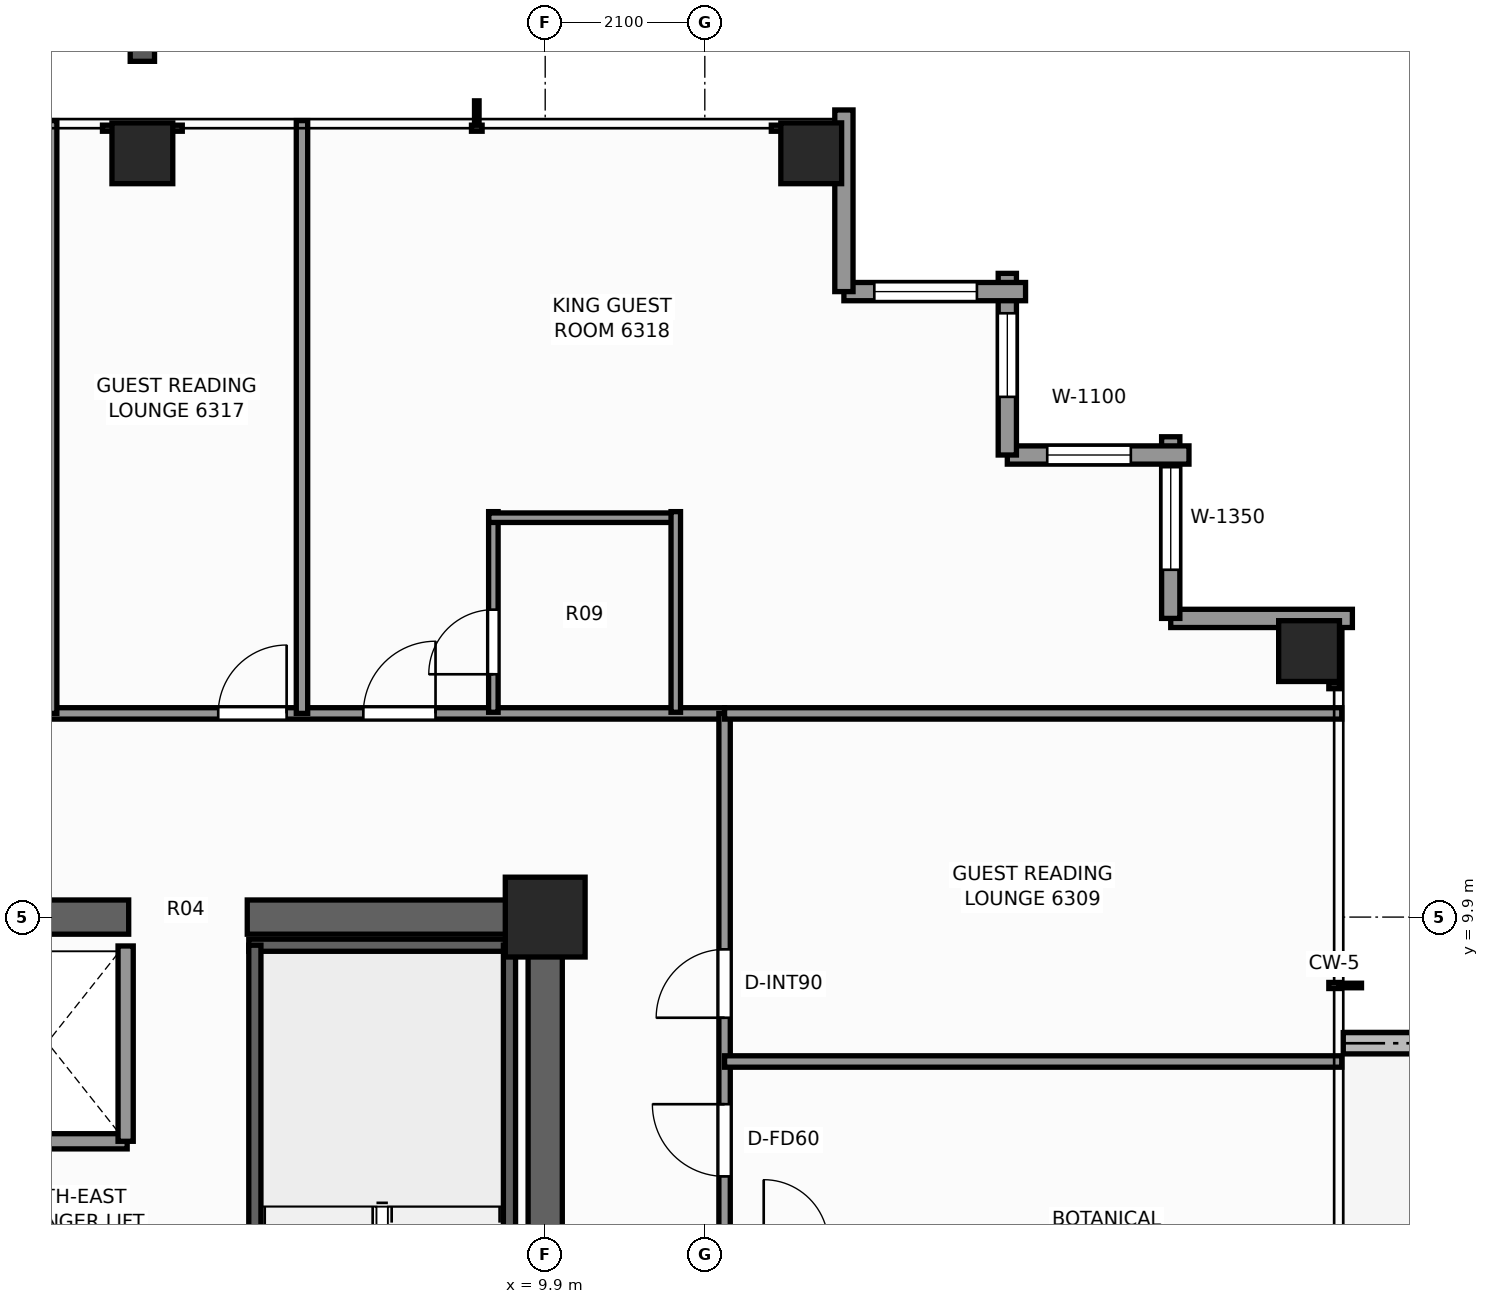
"""IFC4 building model, lengths in metres.
Left out: names, types, materials, properties, quantities, classifications, styles, units other than length and angle.
Written with IfcOpenShell. Run it as: python <this file> out.ifc"""

import sys

from ifc_helpers import new_model, si_unit, direction, frame, frame_2d, origin, origin_2d, place, context, subcontext, project, spatial, rectangle, extrude, element, fill, save


model = new_model("IFC4")
c1 = context("Model", 3, precision=1e-05, world=origin(), true_north=direction((0.0, 1.0)))
c2 = subcontext(c1, "Body", "Model", "MODEL_VIEW")
j1 = project(units=[si_unit("LENGTHUNIT", "METRE"), si_unit("PLANEANGLEUNIT", "RADIAN")], contexts=[c1])
p1 = place(None, origin())
s1 = spatial("IfcSite", under=j1, at=p1, CompositionType="ELEMENT")
p2 = place(p1, origin())
s2 = spatial("IfcBuilding", under=s1, at=p2, CompositionType="ELEMENT")
p3 = place(p2, frame((0.0, 0.0, 216.3)))
s3 = spatial("IfcBuildingStorey", under=s2, at=p3, CompositionType="ELEMENT", Elevation=216.3)
p4 = place(p3, frame((-10.125, 9.9, 0.0), z_axis=(0.0, 0.0, 1.0), x_axis=(1.0, 0.0, 0.0)))
e1 = element("IfcWall", 1, at=p4, inside=s3, PredefinedType="SHEAR", context=c2, shape_type="SweptSolid", body=[
    extrude(rectangle(XDim=14.545, YDim=0.45, at=frame_2d((7.272, 0.0))), origin(), (0.0, 0.0, 1.0), 3.3),
])
p5 = place(p3, frame((5.98, 9.9, 0.0), z_axis=(0.0, 0.0, 1.0), x_axis=(1.0, 0.0, 0.0)))
e2 = element("IfcWall", 2, at=p5, inside=s3, PredefinedType="SHEAR", context=c2, shape_type="SweptSolid", body=[
    extrude(rectangle(XDim=4.145, YDim=0.45, at=frame_2d((2.073, 0.0))), origin(), (0.0, 0.0, 1.0), 3.3),
])
p6 = place(p3, frame((9.9, -3.7, 0.0), z_axis=(0.0, 0.0, 1.0), x_axis=(0.0, 1.0, 0.0)))
e3 = element("IfcWall", 3, at=p6, inside=s3, PredefinedType="SHEAR", context=c2, shape_type="SweptSolid", body=[
    extrude(rectangle(XDim=13.375, YDim=0.45, at=frame_2d((6.688, 0.0))), origin(), (0.0, 0.0, 1.0), 3.3),
])
p7 = place(p6, frame((0.35, 0.0, 0.0)))
e4 = element("IfcOpeningElement", 4, at=p7, cuts=e3, PredefinedType="OPENING", context=c2, shape_type="SweptSolid", body=[
    extrude(rectangle(XDim=1.1, YDim=2.2, at=frame_2d((0.55, 1.1))), frame((0.0, 0.235, 0.0), z_axis=(0.0, -1.0, 0.0), x_axis=(1.0, 0.0, 0.0)), (0.0, 0.0, 1.0), 0.47),
])
p8 = place(p3, frame((9.9, 9.9, 0.0), z_axis=(0.0, 0.0, 1.0), x_axis=(1.0, 0.0, 0.0)))
e5 = element("IfcColumn", 5, at=p8, inside=s3, PredefinedType="COLUMN", context=c2, shape_type="SweptSolid", body=[
    extrude(rectangle(XDim=1.05, YDim=1.05, at=origin_2d()), origin(), (0.0, 0.0, 1.0), 3.3),
])
for number, where, z_axis, x_axis in (
    (6, (4.6, 19.95, 0.0), (0.0, 0.0, 1.0), (1.0, 0.0, 0.0)),
    (7, (13.4, 19.95, 0.0), (0.0, 0.0, 1.0), (1.0, 0.0, 0.0)),
    (8, (19.95, 13.4, 0.0), (0.0, 0.0, 1.0), (1.0, 0.0, 0.0)),
):
    element("IfcColumn", number, at=place(p3, frame(where, z_axis=z_axis, x_axis=x_axis)), inside=s3, PredefinedType="COLUMN", context=c2, shape_type="SweptSolid", body=[
        extrude(rectangle(XDim=0.8, YDim=0.8, at=origin_2d()), origin(), (0.0, 0.0, 1.0), 3.3),
    ])
p9 = place(p3, frame((22.105, 8.24, -0.04), z_axis=(0.0, 0.0, 1.0), x_axis=(-1.0, 0.0, 0.0)))
e9 = element("IfcWall", 9, at=p9, inside=s3, PredefinedType="PARAPET", context=c2, shape_type="SweptSolid", body=[
    extrude(rectangle(XDim=1.705, YDim=0.28, at=frame_2d((0.853, 0.0))), origin(), (0.0, 0.0, 1.0), 0.42),
])
p10 = place(p3, frame((18.13, 13.83, 0.0), z_axis=(0.0, 0.0, 1.0), x_axis=(1.0, 0.0, 0.0)))
e10 = element("IfcWall", 10, at=p10, inside=s3, PredefinedType="STANDARD", context=c2, shape_type="SweptSolid", body=[
    extrude(rectangle(XDim=2.39, YDim=0.24, at=frame_2d((1.195, 0.0))), origin(), (0.0, 0.0, 1.0), 2.463),
])
p11 = place(p3, frame((18.13, 16.22, 0.0), z_axis=(0.0, 0.0, 1.0), x_axis=(0.0, -1.0, 0.0)))
e11 = element("IfcWall", 11, at=p11, inside=s3, PredefinedType="STANDARD", context=c2, shape_type="SweptSolid", body=[
    extrude(rectangle(XDim=2.39, YDim=0.24, at=frame_2d((1.195, 0.0))), origin(), (0.0, 0.0, 1.0), 2.463),
])
p12 = place(p11, frame((0.4, 0.0, 0.65)))
e12 = element("IfcOpeningElement", 12, at=p12, cuts=e11, PredefinedType="OPENING", context=c2, shape_type="SweptSolid", body=[
    extrude(rectangle(XDim=1.35, YDim=1.55, at=frame_2d((0.675, 0.775))), frame((0.0, 0.13, 0.0), z_axis=(0.0, -1.0, 0.0), x_axis=(1.0, 0.0, 0.0)), (0.0, 0.0, 1.0), 0.26),
])
p13 = place(p3, frame((15.98, 15.98, 0.0), z_axis=(0.0, 0.0, 1.0), x_axis=(1.0, 0.0, 0.0)))
e13 = element("IfcWall", 13, at=p13, inside=s3, PredefinedType="STANDARD", context=c2, shape_type="SweptSolid", body=[
    extrude(rectangle(XDim=2.39, YDim=0.24, at=frame_2d((1.195, 0.0))), origin(), (0.0, 0.0, 1.0), 2.463),
])
p14 = place(p13, frame((0.525, 0.0, 0.65)))
e14 = element("IfcOpeningElement", 14, at=p14, cuts=e13, PredefinedType="OPENING", context=c2, shape_type="SweptSolid", body=[
    extrude(rectangle(XDim=1.1, YDim=1.45, at=frame_2d((0.55, 0.725))), frame((0.0, 0.13, 0.0), z_axis=(0.0, -1.0, 0.0), x_axis=(1.0, 0.0, 0.0)), (0.0, 0.0, 1.0), 0.26),
])
p15 = place(p3, frame((15.98, 18.37, 0.0), z_axis=(0.0, 0.0, 1.0), x_axis=(0.0, -1.0, 0.0)))
e15 = element("IfcWall", 15, at=p15, inside=s3, PredefinedType="STANDARD", context=c2, shape_type="SweptSolid", body=[
    extrude(rectangle(XDim=2.39, YDim=0.24, at=frame_2d((1.195, 0.0))), origin(), (0.0, 0.0, 1.0), 2.463),
])
p16 = place(p15, frame((0.525, 0.0, 0.65)))
e16 = element("IfcOpeningElement", 16, at=p16, cuts=e15, PredefinedType="OPENING", context=c2, shape_type="SweptSolid", body=[
    extrude(rectangle(XDim=1.1, YDim=1.45, at=frame_2d((0.55, 0.725))), frame((0.0, 0.13, 0.0), z_axis=(0.0, -1.0, 0.0), x_axis=(1.0, 0.0, 0.0)), (0.0, 0.0, 1.0), 0.26),
])
p17 = place(p3, frame((13.83, 18.13, 0.0), z_axis=(0.0, 0.0, 1.0), x_axis=(1.0, 0.0, 0.0)))
e17 = element("IfcWall", 17, at=p17, inside=s3, PredefinedType="STANDARD", context=c2, shape_type="SweptSolid", body=[
    extrude(rectangle(XDim=2.39, YDim=0.24, at=frame_2d((1.195, 0.0))), origin(), (0.0, 0.0, 1.0), 2.463),
])
p18 = place(p17, frame((0.4, 0.0, 0.65)))
e18 = element("IfcOpeningElement", 18, at=p18, cuts=e17, PredefinedType="OPENING", context=c2, shape_type="SweptSolid", body=[
    extrude(rectangle(XDim=1.35, YDim=1.55, at=frame_2d((0.675, 0.775))), frame((0.0, 0.13, 0.0), z_axis=(0.0, -1.0, 0.0), x_axis=(1.0, 0.0, 0.0)), (0.0, 0.0, 1.0), 0.26),
])
p19 = place(p3, frame((13.83, 20.52, 0.0), z_axis=(0.0, 0.0, 1.0), x_axis=(0.0, -1.0, 0.0)))
e19 = element("IfcWall", 19, at=p19, inside=s3, PredefinedType="STANDARD", context=c2, shape_type="SweptSolid", body=[
    extrude(rectangle(XDim=2.39, YDim=0.24, at=frame_2d((1.195, 0.0))), origin(), (0.0, 0.0, 1.0), 2.463),
])
p20 = place(p3, frame((6.0, 9.53, 0.0), z_axis=(0.0, 0.0, 1.0), x_axis=(1.0, 0.0, 0.0)))
e20 = element("IfcWall", 20, at=p20, inside=s3, PredefinedType="SHEAR", context=c2, shape_type="SweptSolid", body=[
    extrude(rectangle(XDim=3.52, YDim=0.16, at=frame_2d((1.76, 0.0))), origin(), (0.0, 0.0, 1.0), 3.3),
])
for number, where, z_axis, x_axis in (
    (21, (6.08, 1.97, 0.0), (0.0, 0.0, 1.0), (0.0, 1.0, 0.0)),
    (22, (9.43, 1.97, 0.0), (0.0, 0.0, 1.0), (0.0, 1.0, 0.0)),
):
    element("IfcWall", number, at=place(p3, frame(where, z_axis=z_axis, x_axis=x_axis)), inside=s3, PredefinedType="SHEAR", context=c2, shape_type="SweptSolid", body=[
        extrude(rectangle(XDim=7.56, YDim=0.16, at=frame_2d((3.78, 0.0))), origin(), (0.0, 0.0, 1.0), 3.3),
    ])
p21 = place(p3, frame((0.22, 6.95, 0.0), z_axis=(0.0, 0.0, 1.0), x_axis=(1.0, 0.0, 0.0)))
e23 = element("IfcWall", 23, at=p21, inside=s3, PredefinedType="SOLIDWALL", context=c2, shape_type="SweptSolid", body=[
    extrude(rectangle(XDim=4.18, YDim=0.2, at=frame_2d((2.09, 0.0))), origin(), (0.0, 0.0, 1.0), 3.08),
])
p22 = place(p3, frame((4.38, 6.95, 0.0), z_axis=(0.0, 0.0, 1.0), x_axis=(0.0, 1.0, 0.0)))
e24 = element("IfcWall", 24, at=p22, inside=s3, PredefinedType="SOLIDWALL", context=c2, shape_type="SweptSolid", body=[
    extrude(rectangle(XDim=2.57, YDim=0.2, at=frame_2d((1.285, 0.0))), origin(), (0.0, 0.0, 1.0), 3.08),
])
p23 = place(p3, frame((-12.26, 12.58, 0.0), z_axis=(0.0, 0.0, 1.0), x_axis=(1.0, 0.0, 0.0)))
e25 = element("IfcWall", 25, at=p23, inside=s3, PredefinedType="PARTITIONING", context=c2, shape_type="SweptSolid", body=[
    extrude(rectangle(XDim=24.52, YDim=0.15, at=frame_2d((12.26, 0.0))), origin(), (0.0, 0.0, 1.0), 2.369),
])
p24 = place(p23, frame((3.803, 0.0, 0.0)))
e26 = element("IfcOpeningElement", 26, at=p24, cuts=e25, PredefinedType="OPENING", context=c2, shape_type="SweptSolid", body=[
    extrude(rectangle(XDim=0.95, YDim=2.06, at=frame_2d((0.475, 1.03))), frame((0.0, 0.085, 0.0), z_axis=(0.0, -1.0, 0.0), x_axis=(1.0, 0.0, 0.0)), (0.0, 0.0, 1.0), 0.17),
])
p25 = place(p23, frame((5.762, 0.0, 0.0)))
e27 = element("IfcOpeningElement", 27, at=p25, cuts=e25, PredefinedType="OPENING", context=c2, shape_type="SweptSolid", body=[
    extrude(rectangle(XDim=0.9, YDim=2.06, at=frame_2d((0.45, 1.03))), frame((0.0, 0.085, 0.0), z_axis=(0.0, -1.0, 0.0), x_axis=(1.0, 0.0, 0.0)), (0.0, 0.0, 1.0), 0.17),
])
p26 = place(p23, frame((13.518, 0.0, 0.0)))
e28 = element("IfcOpeningElement", 28, at=p26, cuts=e25, PredefinedType="OPENING", context=c2, shape_type="SweptSolid", body=[
    extrude(rectangle(XDim=0.95, YDim=2.06, at=frame_2d((0.475, 1.03))), frame((0.0, 0.085, 0.0), z_axis=(0.0, -1.0, 0.0), x_axis=(1.0, 0.0, 0.0)), (0.0, 0.0, 1.0), 0.17),
])
p27 = place(p23, frame((17.858, 0.0, 0.0)))
e29 = element("IfcOpeningElement", 29, at=p27, cuts=e25, PredefinedType="OPENING", context=c2, shape_type="SweptSolid", body=[
    extrude(rectangle(XDim=0.9, YDim=2.06, at=frame_2d((0.45, 1.03))), frame((0.0, 0.085, 0.0), z_axis=(0.0, -1.0, 0.0), x_axis=(1.0, 0.0, 0.0)), (0.0, 0.0, 1.0), 0.17),
])
p28 = place(p23, frame((19.767, 0.0, 0.0)))
e30 = element("IfcOpeningElement", 30, at=p28, cuts=e25, PredefinedType="OPENING", context=c2, shape_type="SweptSolid", body=[
    extrude(rectangle(XDim=0.95, YDim=2.06, at=frame_2d((0.475, 1.03))), frame((0.0, 0.085, 0.0), z_axis=(0.0, -1.0, 0.0), x_axis=(1.0, 0.0, 0.0)), (0.0, 0.0, 1.0), 0.17),
])
p29 = place(p3, frame((12.26, -12.26, 0.0), z_axis=(0.0, 0.0, 1.0), x_axis=(0.0, 1.0, 0.0)))
e31 = element("IfcWall", 31, at=p29, inside=s3, PredefinedType="PARTITIONING", context=c2, shape_type="SweptSolid", body=[
    extrude(rectangle(XDim=24.84, YDim=0.15, at=frame_2d((12.42, 0.0))), origin(), (0.0, 0.0, 1.0), 2.369),
])
p30 = place(p29, frame((2.686, 0.0, 0.0)))
e32 = element("IfcOpeningElement", 32, at=p30, cuts=e31, PredefinedType="OPENING", context=c2, shape_type="SweptSolid", body=[
    extrude(rectangle(XDim=0.9, YDim=2.06, at=frame_2d((0.45, 1.03))), frame((0.0, 0.085, 0.0), z_axis=(0.0, -1.0, 0.0), x_axis=(1.0, 0.0, 0.0)), (0.0, 0.0, 1.0), 0.17),
])
p31 = place(p29, frame((4.449, 0.0, 0.0)))
e33 = element("IfcOpeningElement", 33, at=p31, cuts=e31, PredefinedType="OPENING", context=c2, shape_type="SweptSolid", body=[
    extrude(rectangle(XDim=0.95, YDim=2.06, at=frame_2d((0.475, 1.03))), frame((0.0, 0.085, 0.0), z_axis=(0.0, -1.0, 0.0), x_axis=(1.0, 0.0, 0.0)), (0.0, 0.0, 1.0), 0.17),
])
p32 = place(p29, frame((13.361, 0.0, 0.0)))
e34 = element("IfcOpeningElement", 34, at=p32, cuts=e31, PredefinedType="OPENING", context=c2, shape_type="SweptSolid", body=[
    extrude(rectangle(XDim=0.95, YDim=2.06, at=frame_2d((0.475, 1.03))), frame((0.0, 0.085, 0.0), z_axis=(0.0, -1.0, 0.0), x_axis=(1.0, 0.0, 0.0)), (0.0, 0.0, 1.0), 0.17),
])
p33 = place(p29, frame((18.748, 0.0, 0.0)))
e35 = element("IfcOpeningElement", 35, at=p33, cuts=e31, PredefinedType="OPENING", context=c2, shape_type="SweptSolid", body=[
    extrude(rectangle(XDim=0.95, YDim=2.06, at=frame_2d((0.475, 1.03))), frame((0.0, 0.085, 0.0), z_axis=(0.0, -1.0, 0.0), x_axis=(1.0, 0.0, 0.0)), (0.0, 0.0, 1.0), 0.17),
])
p34 = place(p29, frame((20.836, 0.0, 0.0)))
e36 = element("IfcOpeningElement", 36, at=p34, cuts=e31, PredefinedType="OPENING", context=c2, shape_type="SweptSolid", body=[
    extrude(rectangle(XDim=0.9, YDim=2.06, at=frame_2d((0.45, 1.03))), frame((0.0, 0.085, 0.0), z_axis=(0.0, -1.0, 0.0), x_axis=(1.0, 0.0, 0.0)), (0.0, 0.0, 1.0), 0.17),
])
p35 = place(p3, frame((12.26, 12.58, 0.0), z_axis=(0.0, 0.0, 1.0), x_axis=(1.0, 0.0, 0.0)))
e37 = element("IfcWall", 37, at=p35, inside=s3, PredefinedType="PARTITIONING", context=c2, shape_type="SweptSolid", body=[
    extrude(rectangle(XDim=8.12, YDim=0.15, at=frame_2d((4.06, 0.0))), origin(), (0.0, 0.0, 1.0), 2.369),
])
p36 = place(p3, frame((12.26, 8.0, 0.0), z_axis=(0.0, 0.0, 1.0), x_axis=(1.0, 0.0, 0.0)))
e38 = element("IfcWall", 38, at=p36, inside=s3, PredefinedType="PARTITIONING", context=c2, shape_type="SweptSolid", body=[
    extrude(rectangle(XDim=8.12, YDim=0.15, at=frame_2d((4.06, 0.0))), origin(), (0.0, 0.0, 1.0), 2.453),
])
for number, where, z_axis, x_axis in (
    (39, (3.4, 12.58, 0.0), (0.0, 0.0, 1.0), (0.0, 1.0, 0.0)),
    (40, (6.7, 12.58, 0.0), (0.0, 0.0, 1.0), (0.0, 1.0, 0.0)),
):
    element("IfcWall", number, at=place(p3, frame(where, z_axis=z_axis, x_axis=x_axis)), inside=s3, PredefinedType="PARTITIONING", context=c2, shape_type="SweptSolid", body=[
        extrude(rectangle(XDim=7.8, YDim=0.15, at=frame_2d((3.9, 0.0))), origin(), (0.0, 0.0, 1.0), 2.453),
    ])
p37 = place(p3, frame((9.218, 12.595, 0.0), z_axis=(0.0, 0.0, 1.0), x_axis=(0.0, 1.0, 0.0)))
e41 = element("IfcWall", 41, at=p37, inside=s3, PredefinedType="PARTITIONING", context=c2, shape_type="SweptSolid", body=[
    extrude(rectangle(XDim=2.64, YDim=0.125, at=frame_2d((1.32, 0.0))), origin(), (0.0, 0.0, 1.0), 3.08),
])
p38 = place(p37, frame((0.5, 0.0, 0.0)))
e42 = element("IfcOpeningElement", 42, at=p38, cuts=e41, PredefinedType="OPENING", context=c2, shape_type="SweptSolid", body=[
    extrude(rectangle(XDim=0.85, YDim=2.03, at=frame_2d((0.425, 1.015))), frame((0.0, 0.073, 0.0), z_axis=(0.0, -1.0, 0.0), x_axis=(1.0, 0.0, 0.0)), (0.0, 0.0, 1.0), 0.145),
])
p39 = place(p3, frame((9.158, 15.155, 0.0), z_axis=(0.0, 0.0, 1.0), x_axis=(1.0, 0.0, 0.0)))
e43 = element("IfcWall", 43, at=p39, inside=s3, PredefinedType="PARTITIONING", context=c2, shape_type="SweptSolid", body=[
    extrude(rectangle(XDim=2.52, YDim=0.125, at=frame_2d((1.26, 0.0))), origin(), (0.0, 0.0, 1.0), 2.369),
])
p40 = place(p3, frame((11.618, 12.595, 0.0), z_axis=(0.0, 0.0, 1.0), x_axis=(0.0, 1.0, 0.0)))
e44 = element("IfcWall", 44, at=p40, inside=s3, PredefinedType="PARTITIONING", context=c2, shape_type="SweptSolid", body=[
    extrude(rectangle(XDim=2.64, YDim=0.125, at=frame_2d((1.32, 0.0))), origin(), (0.0, 0.0, 1.0), 2.369),
])
p41 = place(p12, origin())
e45 = element("IfcWindow", 45, at=p41, inside=s3, PartitioningType="SINGLE_PANEL", PredefinedType="WINDOW", context=c2, shape_type="SweptSolid", body=[
    extrude(rectangle(XDim=1.35, YDim=1.55, at=frame_2d((0.675, 0.775))), frame((0.0, 0.03, 0.0), z_axis=(0.0, -1.0, 0.0), x_axis=(1.0, 0.0, 0.0)), (0.0, 0.0, 1.0), 0.06),
])
fill(e12, e45)
p42 = place(p14, origin())
e46 = element("IfcWindow", 46, at=p42, inside=s3, PartitioningType="SINGLE_PANEL", PredefinedType="WINDOW", context=c2, shape_type="SweptSolid", body=[
    extrude(rectangle(XDim=1.1, YDim=1.45, at=frame_2d((0.55, 0.725))), frame((0.0, 0.03, 0.0), z_axis=(0.0, -1.0, 0.0), x_axis=(1.0, 0.0, 0.0)), (0.0, 0.0, 1.0), 0.06),
])
fill(e14, e46)
p43 = place(p16, origin())
e47 = element("IfcWindow", 47, at=p43, inside=s3, PartitioningType="SINGLE_PANEL", PredefinedType="WINDOW", context=c2, shape_type="SweptSolid", body=[
    extrude(rectangle(XDim=1.1, YDim=1.45, at=frame_2d((0.55, 0.725))), frame((0.0, 0.03, 0.0), z_axis=(0.0, -1.0, 0.0), x_axis=(1.0, 0.0, 0.0)), (0.0, 0.0, 1.0), 0.06),
])
fill(e16, e47)
p44 = place(p18, origin())
e48 = element("IfcWindow", 48, at=p44, inside=s3, PartitioningType="SINGLE_PANEL", PredefinedType="WINDOW", context=c2, shape_type="SweptSolid", body=[
    extrude(rectangle(XDim=1.35, YDim=1.55, at=frame_2d((0.675, 0.775))), frame((0.0, 0.03, 0.0), z_axis=(0.0, -1.0, 0.0), x_axis=(1.0, 0.0, 0.0)), (0.0, 0.0, 1.0), 0.06),
])
fill(e18, e48)
p45 = place(p33, origin())
e49 = element("IfcDoor", 49, at=p45, inside=s3, OperationType="SINGLE_SWING_RIGHT", PredefinedType="DOOR", context=c2, shape_type="SweptSolid", body=[
    extrude(rectangle(XDim=0.95, YDim=2.06, at=frame_2d((0.475, 1.03))), frame((0.0, 0.025, 0.0), z_axis=(0.0, -1.0, 0.0), x_axis=(1.0, 0.0, 0.0)), (0.0, 0.0, 1.0), 0.05),
])
fill(e35, e49)
p46 = place(p34, origin())
e50 = element("IfcDoor", 50, at=p46, inside=s3, OperationType="SINGLE_SWING_LEFT", PredefinedType="DOOR", context=c2, shape_type="SweptSolid", body=[
    extrude(rectangle(XDim=0.9, YDim=2.06, at=frame_2d((0.45, 1.03))), frame((0.0, 0.025, 0.0), z_axis=(0.0, -1.0, 0.0), x_axis=(1.0, 0.0, 0.0)), (0.0, 0.0, 1.0), 0.05),
])
fill(e36, e50)
p47 = place(p27, origin())
e51 = element("IfcDoor", 51, at=p47, inside=s3, OperationType="SINGLE_SWING_RIGHT", PredefinedType="DOOR", context=c2, shape_type="SweptSolid", body=[
    extrude(rectangle(XDim=0.9, YDim=2.06, at=frame_2d((0.45, 1.03))), frame((0.0, 0.025, 0.0), z_axis=(0.0, -1.0, 0.0), x_axis=(1.0, 0.0, 0.0)), (0.0, 0.0, 1.0), 0.05),
])
fill(e29, e51)
p48 = place(p38, origin())
e52 = element("IfcDoor", 52, at=p48, inside=s3, OperationType="SINGLE_SWING_LEFT", PredefinedType="DOOR", context=c2, shape_type="SweptSolid", body=[
    extrude(rectangle(XDim=0.85, YDim=2.03, at=frame_2d((0.425, 1.015))), frame((0.0, 0.025, 0.0), z_axis=(0.0, -1.0, 0.0), x_axis=(1.0, 0.0, 0.0)), (0.0, 0.0, 1.0), 0.05),
])
fill(e42, e52)
p49 = place(p28, origin())
e53 = element("IfcDoor", 53, at=p49, inside=s3, OperationType="SINGLE_SWING_RIGHT", PredefinedType="DOOR", context=c2, shape_type="SweptSolid", body=[
    extrude(rectangle(XDim=0.95, YDim=2.06, at=frame_2d((0.475, 1.03))), frame((0.0, 0.025, 0.0), z_axis=(0.0, -1.0, 0.0), x_axis=(1.0, 0.0, 0.0)), (0.0, 0.0, 1.0), 0.05),
])
fill(e30, e53)
save(model, sys.argv[1])
